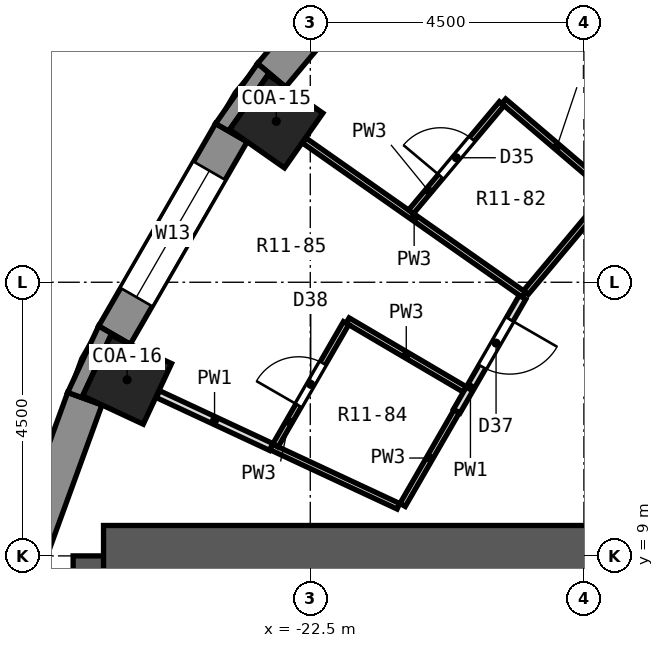
"""IFC4 building model, lengths in metres.
Left out: names, types, materials, properties, quantities, classifications, styles, units other than length and angle.
Written with IfcOpenShell. Run it as: python <this file> out.ifc"""

import sys

from ifc_helpers import new_model, si_unit, direction, frame, frame_2d, origin, origin_2d, place, context, subcontext, project, spatial, polyline, rectangle, outline, extrude, element, fill, save


model = new_model("IFC4")
c1 = context("Model", 3, precision=1e-05, world=origin(), true_north=direction((0.0, 1.0)))
c2 = subcontext(c1, "Body", "Model", "MODEL_VIEW")
j1 = project(units=[si_unit("LENGTHUNIT", "METRE"), si_unit("PLANEANGLEUNIT", "RADIAN")], contexts=[c1])
p1 = place(None, origin())
s1 = spatial("IfcSite", under=j1, at=p1, CompositionType="ELEMENT")
p2 = place(p1, origin())
s2 = spatial("IfcBuilding", under=s1, at=p2, CompositionType="ELEMENT")
p3 = place(p2, frame((0.0, 0.0, 46.1)))
s3 = spatial("IfcBuildingStorey", under=s2, at=p3, CompositionType="ELEMENT", Elevation=46.1)
for number, where, z_axis, x_axis in (
    (1, (-23.059, 16.146, 0.0), (0.0, 0.0, 1.0), (-0.819, 0.574, 0.0)),
    (2, (-25.512, 11.897, 0.0), (0.0, 0.0, 1.0), (-0.906, 0.423, 0.0)),
):
    element("IfcColumn", number, at=place(p3, frame(where, z_axis=z_axis, x_axis=x_axis)), inside=s3, PredefinedType="COLUMN", context=c2, shape_type="SweptSolid", body=[
        extrude(rectangle(XDim=1.1, YDim=1.1, at=origin_2d()), origin(), (0.0, 0.0, 1.0), 3.3),
    ])
p4 = place(p3, frame((-25.9, -9.0, 0.0), z_axis=(0.0, 0.0, 1.0), x_axis=(0.0, 1.0, 0.0)))
e3 = element("IfcWall", 3, at=p4, inside=s3, PredefinedType="SHEAR", context=c2, shape_type="SweptSolid", body=[
    extrude(rectangle(XDim=18.0, YDim=1.0, at=frame_2d((9.0, 0.0))), origin(), (0.0, 0.0, 1.0), 3.3),
])
p5 = place(p3, frame((-13.5, 9.0, 0.0), z_axis=(0.0, 0.0, 1.0), x_axis=(-1.0, 0.0, 0.0)))
e4 = element("IfcWall", 4, at=p5, inside=s3, PredefinedType="SHEAR", context=c2, shape_type="SweptSolid", body=[
    extrude(rectangle(XDim=12.4, YDim=1.0, at=frame_2d((6.2, 0.0))), origin(), (0.0, 0.0, 1.0), 3.3),
])
p6 = place(p3, frame((-20.665, 19.85, 0.0), z_axis=(0.0, 0.0, 1.0), x_axis=(-0.642809392687, -0.766026164483, 0.0)))
e5 = element("IfcWall", 5, at=p6, inside=s3, PredefinedType="SOLIDWALL", context=c2, shape_type="SweptSolid", body=[
    extrude(rectangle(XDim=3.846, YDim=0.6, at=frame_2d((1.923, 0.0))), origin(), (0.0, 0.0, 1.0), 2.75),
])
p7 = place(p6, frame((0.723, 0.0, 0.9)))
e6 = element("IfcOpeningElement", 6, at=p7, cuts=e5, PredefinedType="OPENING", context=c2, shape_type="SweptSolid", body=[
    extrude(rectangle(XDim=2.4, YDim=1.8, at=frame_2d((1.2, 0.9))), frame((0.0, 0.312, 0.0), z_axis=(0.0, -1.0, 0.0), x_axis=(1.0, 0.0, 0.0)), (0.0, 0.0, 1.0), 0.624),
])
p8 = place(p3, frame((-23.798, 15.96, 0.0), z_axis=(0.0, 0.0, 1.0), x_axis=(-0.499989888488, -0.86603124159, 0.0)))
e7 = element("IfcWall", 7, at=p8, inside=s3, PredefinedType="SOLIDWALL", context=c2, shape_type="SweptSolid", body=[
    extrude(rectangle(XDim=3.846, YDim=0.6, at=frame_2d((1.923, 0.0))), origin(), (0.0, 0.0, 1.0), 2.75),
])
p9 = place(p8, frame((0.723, 0.0, 0.9)))
e8 = element("IfcOpeningElement", 8, at=p9, cuts=e7, PredefinedType="OPENING", context=c2, shape_type="SweptSolid", body=[
    extrude(rectangle(XDim=2.4, YDim=1.8, at=frame_2d((1.2, 0.9))), frame((0.0, 0.312, 0.0), z_axis=(0.0, -1.0, 0.0), x_axis=(1.0, 0.0, 0.0)), (0.0, 0.0, 1.0), 0.624),
])
p10 = place(p3, frame((-26.208, 11.585, 0.0), z_axis=(0.0, 0.0, 1.0), x_axis=(-0.342028474173, -0.939689588564, 0.0)))
e9 = element("IfcWall", 9, at=p10, inside=s3, PredefinedType="SOLIDWALL", context=c2, shape_type="SweptSolid", body=[
    extrude(rectangle(XDim=3.846, YDim=0.6, at=frame_2d((1.923, 0.0))), origin(), (0.0, 0.0, 1.0), 2.75),
])
p11 = place(p3, origin())
e10 = element("IfcWall", 10, at=p11, inside=s3, PredefinedType="SOLIDWALL", context=c2, shape_type="SweptSolid", body=[
    extrude(outline(polyline([(-23.367, 17.097), (-24.058, 16.11), (-23.538, 15.81), (-23.825, 16.011), (-23.194, 16.912), (-22.907, 16.711), (-23.367, 17.097)])), origin(), (0.0, 0.0, 1.0), 2.75),
])
p12 = place(p3, origin())
e11 = element("IfcWall", 11, at=p12, inside=s3, PredefinedType="SOLIDWALL", context=c2, shape_type="SweptSolid", body=[
    extrude(outline(polyline([(-26.49, 11.688), (-25.926, 11.483), (-26.243, 11.631), (-25.779, 12.628), (-25.461, 12.479), (-25.981, 12.78), (-26.49, 11.688)])), origin(), (0.0, 0.0, 1.0), 2.75),
])
p13 = place(p3, frame((-19.509, 19.509, 0.0), z_axis=(0.0, 0.0, 1.0), x_axis=(0.707106781187, -0.707106781187, 0.0)))
e12 = element("IfcWall", 12, at=p13, inside=s3, PredefinedType="PARTITIONING", context=c2, shape_type="SweptSolid", body=[
    extrude(rectangle(XDim=4.413, YDim=0.1, at=frame_2d((2.206, 0.0))), origin(), (0.0, 0.0, 1.0), 2.75),
])
p14 = place(p3, frame((-19.319, 16.476, 0.0), z_axis=(0.0, 0.0, 1.0), x_axis=(0.760722977127, -0.649076691979, 0.0)))
e13 = element("IfcWall", 13, at=p14, inside=s3, PredefinedType="PARTITIONING", context=c2, shape_type="SweptSolid", body=[
    extrude(rectangle(XDim=2.301, YDim=0.1, at=frame_2d((1.15, 0.0))), origin(), (0.0, 0.0, 1.0), 2.75),
])
p15 = place(p3, frame((-22.597, 15.829, 0.0), z_axis=(0.0, 0.0, 1.0), x_axis=(0.818435722788, -0.57459809229, 0.0)))
e14 = element("IfcWall", 14, at=p15, inside=s3, PredefinedType="PARTITIONING", context=c2, shape_type="SweptSolid", body=[
    extrude(rectangle(XDim=4.413, YDim=0.1, at=frame_2d((2.206, 0.0))), origin(), (0.0, 0.0, 1.0), 2.75),
])
p16 = place(p3, frame((-21.886, 12.871, 0.0), z_axis=(0.0, 0.0, 1.0), x_axis=(0.861880909545, -0.507110735206, 0.0)))
e15 = element("IfcWall", 15, at=p16, inside=s3, PredefinedType="PARTITIONING", context=c2, shape_type="SweptSolid", body=[
    extrude(rectangle(XDim=2.237, YDim=0.1, at=frame_2d((1.119, 0.0))), origin(), (0.0, 0.0, 1.0), 2.75),
])
p17 = place(p3, frame((-23.144, 10.792, 0.0), z_axis=(0.0, 0.0, 1.0), x_axis=(0.906334330548, -0.422561334329, 0.0)))
e16 = element("IfcWall", 16, at=p17, inside=s3, PredefinedType="PARTITIONING", context=c2, shape_type="SweptSolid", body=[
    extrude(rectangle(XDim=2.309, YDim=0.1, at=frame_2d((1.155, 0.0))), origin(), (0.0, 0.0, 1.0), 2.75),
])
p18 = place(p3, frame((-25.005, 11.66, 0.0), z_axis=(0.0, 0.0, 1.0), x_axis=(0.906316757735, -0.422599023483, 0.0)))
e17 = element("IfcWall", 17, at=p18, inside=s3, PredefinedType="PARTITIONING", context=c2, shape_type="SweptSolid", body=[
    extrude(rectangle(XDim=2.053, YDim=0.125, at=frame_2d((1.027, 0.0))), origin(), (0.0, 0.0, 1.0), 2.75),
])
p19 = place(p3, frame((-18.954, 13.332, 0.0), z_axis=(0.0, 0.0, 1.0), x_axis=(0.642759429892, 0.766068087891, 0.0)))
e18 = element("IfcWall", 18, at=p19, inside=s3, PredefinedType="PARTITIONING", context=c2, shape_type="SweptSolid", body=[
    extrude(rectangle(XDim=2.105, YDim=0.1, at=frame_2d((1.052, 0.0))), origin(), (0.0, 0.0, 1.0), 2.75),
])
p20 = place(p3, frame((-20.845, 14.657, 0.0), z_axis=(0.0, 0.0, 1.0), x_axis=(0.642753483788, 0.766073076853, 0.0)))
e19 = element("IfcWall", 19, at=p20, inside=s3, PredefinedType="PARTITIONING", context=c2, shape_type="SweptSolid", body=[
    extrude(rectangle(XDim=2.324, YDim=0.1, at=frame_2d((1.162, 0.0))), origin(), (0.0, 0.0, 1.0), 2.75),
])
p21 = place(p20, frame((0.762, 0.0, 0.0)))
e20 = element("IfcOpeningElement", 20, at=p21, cuts=e19, PredefinedType="OPENING", context=c2, shape_type="SweptSolid", body=[
    extrude(rectangle(XDim=0.8, YDim=2.1, at=frame_2d((0.4, 1.05))), frame((0.0, 0.062, 0.0), z_axis=(0.0, -1.0, 0.0), x_axis=(1.0, 0.0, 0.0)), (0.0, 0.0, 1.0), 0.124),
])
p22 = place(p3, frame((-20.981, 9.838, 0.0), z_axis=(0.0, 0.0, 1.0), x_axis=(0.49973828311, 0.866176453382, 0.0)))
e21 = element("IfcWall", 21, at=p22, inside=s3, PredefinedType="PARTITIONING", context=c2, shape_type="SweptSolid", body=[
    extrude(rectangle(XDim=1.78, YDim=0.1, at=frame_2d((0.89, 0.0))), origin(), (0.0, 0.0, 1.0), 2.75),
])
p23 = place(p3, frame((-20.091, 11.38, 0.0), z_axis=(0.0, 0.0, 1.0), x_axis=(0.500296430081, 0.865854192141, 0.0)))
e22 = element("IfcWall", 22, at=p23, inside=s3, PredefinedType="PARTITIONING", context=c2, shape_type="SweptSolid", body=[
    extrude(rectangle(XDim=2.16, YDim=0.125, at=frame_2d((1.08, 0.0))), origin(), (0.0, 0.0, 1.0), 2.75),
])
p24 = place(p23, frame((0.842, 0.0, 0.0)))
e23 = element("IfcOpeningElement", 23, at=p24, cuts=e22, PredefinedType="OPENING", context=c2, shape_type="SweptSolid", body=[
    extrude(rectangle(XDim=0.9, YDim=2.1, at=frame_2d((0.45, 1.05))), frame((0.0, 0.074, 0.0), z_axis=(0.0, -1.0, 0.0), x_axis=(1.0, 0.0, 0.0)), (0.0, 0.0, 1.0), 0.149),
])
p25 = place(p3, frame((-23.073, 10.816, 0.0), z_axis=(0.0, 0.0, 1.0), x_axis=(0.500174283544, 0.865924757748, 0.0)))
e24 = element("IfcWall", 24, at=p25, inside=s3, PredefinedType="PARTITIONING", context=c2, shape_type="SweptSolid", body=[
    extrude(rectangle(XDim=2.323, YDim=0.1, at=frame_2d((1.162, 0.0))), origin(), (0.0, 0.0, 1.0), 2.75),
])
p26 = place(p25, frame((0.76, 0.0, 0.0)))
e25 = element("IfcOpeningElement", 25, at=p26, cuts=e24, PredefinedType="OPENING", context=c2, shape_type="SweptSolid", body=[
    extrude(rectangle(XDim=0.8, YDim=2.1, at=frame_2d((0.4, 1.05))), frame((0.0, 0.062, 0.0), z_axis=(0.0, -1.0, 0.0), x_axis=(1.0, 0.0, 0.0)), (0.0, 0.0, 1.0), 0.124),
])
p27 = place(p9, origin())
e26 = element("IfcWindow", 26, at=p27, inside=s3, PartitioningType="SINGLE_PANEL", PredefinedType="WINDOW", context=c2, shape_type="SweptSolid", body=[
    extrude(rectangle(XDim=2.4, YDim=1.8, at=frame_2d((1.2, 0.9))), frame((0.0, 0.18, 0.0), z_axis=(0.0, -1.0, 0.0), x_axis=(1.0, 0.0, 0.0)), (0.0, 0.0, 1.0), 0.06),
])
fill(e8, e26)
p28 = place(p21, origin())
e27 = element("IfcDoor", 27, at=p28, inside=s3, OperationType="SINGLE_SWING_LEFT", PredefinedType="DOOR", context=c2, shape_type="SweptSolid", body=[
    extrude(rectangle(XDim=0.8, YDim=2.1, at=frame_2d((0.4, 1.05))), frame((0.0, 0.025, 0.0), z_axis=(0.0, -1.0, 0.0), x_axis=(1.0, 0.0, 0.0)), (0.0, 0.0, 1.0), 0.05),
])
fill(e20, e27)
p29 = place(p24, frame((0.9, 0.0, 0.0), z_axis=(0.0, 0.0, 1.0), x_axis=(-1.0, 0.0, 0.0)))
e28 = element("IfcDoor", 28, at=p29, inside=s3, OperationType="SINGLE_SWING_LEFT", PredefinedType="DOOR", context=c2, shape_type="SweptSolid", body=[
    extrude(rectangle(XDim=0.9, YDim=2.1, at=frame_2d((0.45, 1.05))), frame((0.0, 0.025, 0.0), z_axis=(0.0, -1.0, 0.0), x_axis=(1.0, 0.0, 0.0)), (0.0, 0.0, 1.0), 0.05),
])
fill(e23, e28)
p30 = place(p26, origin())
e29 = element("IfcDoor", 29, at=p30, inside=s3, OperationType="SINGLE_SWING_LEFT", PredefinedType="DOOR", context=c2, shape_type="SweptSolid", body=[
    extrude(rectangle(XDim=0.8, YDim=2.1, at=frame_2d((0.4, 1.05))), frame((0.0, 0.025, 0.0), z_axis=(0.0, -1.0, 0.0), x_axis=(1.0, 0.0, 0.0)), (0.0, 0.0, 1.0), 0.05),
])
fill(e25, e29)
save(model, sys.argv[1])
